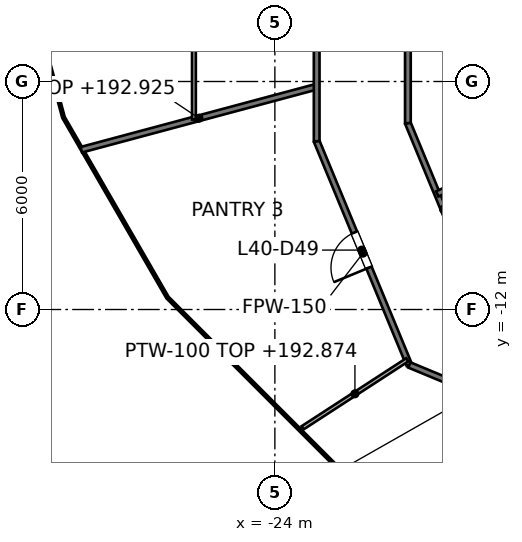
"""IFC4 building model, lengths in metres.
Left out: names, types, materials, properties, quantities, classifications, styles, units other than length and angle.
Written with IfcOpenShell. Run it as: python <this file> out.ifc"""

import sys

from ifc_helpers import new_model, si_unit, direction, frame, frame_2d, origin, place, context, subcontext, project, spatial, rectangle, extrude, element, fill, save


model = new_model("IFC4")
c1 = context("Model", 3, precision=1e-05, world=origin(), true_north=direction((0.0, 1.0)))
c2 = subcontext(c1, "Body", "Model", "MODEL_VIEW")
j1 = project(units=[si_unit("LENGTHUNIT", "METRE"), si_unit("PLANEANGLEUNIT", "RADIAN")], contexts=[c1])
p1 = place(None, origin())
s1 = spatial("IfcSite", under=j1, at=p1, CompositionType="ELEMENT")
p2 = place(p1, origin())
s2 = spatial("IfcBuilding", under=s1, at=p2, CompositionType="ELEMENT")
p3 = place(p2, frame((0.0, 0.0, 189.6)))
s3 = spatial("IfcBuildingStorey", under=s2, at=p3, CompositionType="ELEMENT", Elevation=189.6)
p4 = place(p3, frame((-22.9, -7.572, 0.0), z_axis=(0.0, 0.0, 1.0), x_axis=(0.382367581622, -0.924010298928, 0.0)))
e1 = element("IfcWall", 1, at=p4, inside=s3, PredefinedType="PARTITIONING", context=c2, shape_type="SweptSolid", body=[
    extrude(rectangle(XDim=6.374, YDim=0.15, at=frame_2d((3.187, 0.0))), origin(), (0.0, 0.0, 1.0), 2.777),
])
p5 = place(p4, frame((2.6, 0.0, 0.0)))
e2 = element("IfcOpeningElement", 2, at=p5, cuts=e1, PredefinedType="OPENING", context=c2, shape_type="SweptSolid", body=[
    extrude(rectangle(XDim=1.0, YDim=2.1, at=frame_2d((0.5, 1.05))), frame((0.0, 0.075, 0.0), z_axis=(0.0, -1.0, 0.0), x_axis=(1.0, 0.0, 0.0)), (0.0, 0.0, 1.0), 0.15),
])
p6 = place(p3, frame((-20.5, -7.095, 0.0), z_axis=(0.0, 0.0, 1.0), x_axis=(0.382364990163, -0.924011371303, 0.0)))
e3 = element("IfcWall", 3, at=p6, inside=s3, PredefinedType="PARTITIONING", context=c2, shape_type="SweptSolid", body=[
    extrude(rectangle(XDim=4.902, YDim=0.15, at=frame_2d((2.451, 0.0))), origin(), (0.0, 0.0, 1.0), 2.845),
])
p7 = place(p3, frame((-20.46, -13.46, 0.0), z_axis=(0.0, 0.0, 1.0), x_axis=(0.923801547606, -0.382871650349, 0.0)))
e4 = element("IfcWall", 4, at=p7, inside=s3, PredefinedType="PARTITIONING", context=c2, shape_type="SweptSolid", body=[
    extrude(rectangle(XDim=6.415, YDim=0.15, at=frame_2d((3.208, 0.0))), origin(), (0.0, 0.0, 1.0), 2.777),
])
p8 = place(p7, frame((2.707, 0.0, 0.0)))
e5 = element("IfcOpeningElement", 5, at=p8, cuts=e4, PredefinedType="OPENING", context=c2, shape_type="SweptSolid", body=[
    extrude(rectangle(XDim=1.0, YDim=2.1, at=frame_2d((0.5, 1.05))), frame((0.0, 0.075, 0.0), z_axis=(0.0, -1.0, 0.0), x_axis=(1.0, 0.0, 0.0)), (0.0, 0.0, 1.0), 0.15),
])
p9 = place(p3, frame((-29.094, -7.796, 0.0), z_axis=(0.0, 0.0, 1.0), x_axis=(0.965917630497, 0.258849630277, 0.0)))
e6 = element("IfcWall", 6, at=p9, inside=s3, PredefinedType="PARTITIONING", context=c2, shape_type="SweptSolid", body=[
    extrude(rectangle(XDim=6.413, YDim=0.15, at=frame_2d((3.206, 0.0))), origin(), (0.0, 0.0, 1.0), 3.325),
])
p10 = place(p3, frame((-19.728, -8.958, 0.0), z_axis=(0.0, 0.0, 1.0), x_axis=(0.910629511797, 0.413223779863, 0.0)))
e7 = element("IfcWall", 7, at=p10, inside=s3, PredefinedType="PARTITIONING", context=c2, shape_type="SweptSolid", body=[
    extrude(rectangle(XDim=5.368, YDim=0.15, at=frame_2d((2.684, 0.0))), origin(), (0.0, 0.0, 1.0), 3.7),
])
p11 = place(p3, frame((-20.5, -7.095, 0.0), z_axis=(0.0, 0.0, 1.0), x_axis=(0.0, 1.0, 0.0)))
e8 = element("IfcWall", 8, at=p11, inside=s3, PredefinedType="PARTITIONING", context=c2, shape_type="SweptSolid", body=[
    extrude(rectangle(XDim=14.569, YDim=0.15, at=frame_2d((7.285, 0.0))), origin(), (0.0, 0.0, 1.0), 2.768),
])
p12 = place(p11, frame((10.234, 0.0, 0.0)))
e9 = element("IfcOpeningElement", 9, at=p12, cuts=e8, PredefinedType="OPENING", context=c2, shape_type="SweptSolid", body=[
    extrude(rectangle(XDim=1.0, YDim=2.1, at=frame_2d((0.5, 1.05))), frame((0.0, 0.075, 0.0), z_axis=(0.0, -1.0, 0.0), x_axis=(1.0, 0.0, 0.0)), (0.0, 0.0, 1.0), 0.15),
])
p13 = place(p11, frame((3.0, 0.0, 0.0)))
e10 = element("IfcOpeningElement", 10, at=p13, cuts=e8, PredefinedType="OPENING", context=c2, shape_type="SweptSolid", body=[
    extrude(rectangle(XDim=1.0, YDim=2.1, at=frame_2d((0.5, 1.05))), frame((0.0, 0.075, 0.0), z_axis=(0.0, -1.0, 0.0), x_axis=(1.0, 0.0, 0.0)), (0.0, 0.0, 1.0), 0.15),
])
p14 = place(p3, frame((-22.9, -7.572, 0.0), z_axis=(0.0, 0.0, 1.0), x_axis=(0.0, 1.0, 0.0)))
e11 = element("IfcWall", 11, at=p14, inside=s3, PredefinedType="PARTITIONING", context=c2, shape_type="SweptSolid", body=[
    extrude(rectangle(XDim=15.689, YDim=0.15, at=frame_2d((7.844, 0.0))), origin(), (0.0, 0.0, 1.0), 2.768),
])
p15 = place(p14, frame((6.438, 0.0, 0.0)))
e12 = element("IfcOpeningElement", 12, at=p15, cuts=e11, PredefinedType="OPENING", context=c2, shape_type="SweptSolid", body=[
    extrude(rectangle(XDim=1.0, YDim=2.1, at=frame_2d((0.5, 1.05))), frame((0.0, 0.075, 0.0), z_axis=(0.0, -1.0, 0.0), x_axis=(1.0, 0.0, 0.0)), (0.0, 0.0, 1.0), 0.15),
])
p16 = place(p3, frame((-23.271, -15.113, 0.0), z_axis=(0.0, 0.0, 1.0), x_axis=(0.83866769183, 0.544643463819, 0.0)))
e13 = element("IfcWall", 13, at=p16, inside=s3, PredefinedType="PARTITIONING", context=c2, shape_type="SweptSolid", body=[
    extrude(rectangle(XDim=3.285, YDim=0.1, at=frame_2d((1.643, 0.0))), origin(), (0.0, 0.0, 1.0), 3.273),
])
p17 = place(p3, frame((-26.13, -7.002, 0.0), z_axis=(0.0, 0.0, 1.0), x_axis=(0.0, 1.0, 0.0)))
e14 = element("IfcWall", 14, at=p17, inside=s3, PredefinedType="PARTITIONING", context=c2, shape_type="SweptSolid", body=[
    extrude(rectangle(XDim=15.985, YDim=0.1, at=frame_2d((7.992, 0.0))), origin(), (0.0, 0.0, 1.0), 2.768),
])
p18 = place(p17, frame((5.828, 0.0, 0.0)))
e15 = element("IfcOpeningElement", 15, at=p18, cuts=e14, PredefinedType="OPENING", context=c2, shape_type="SweptSolid", body=[
    extrude(rectangle(XDim=0.9, YDim=2.1, at=frame_2d((0.45, 1.05))), frame((0.0, 0.05, 0.0), z_axis=(0.0, -1.0, 0.0), x_axis=(1.0, 0.0, 0.0)), (0.0, 0.0, 1.0), 0.1),
])
p19 = place(p5, origin())
e16 = element("IfcDoor", 16, at=p19, inside=s3, OperationType="SINGLE_SWING_RIGHT", PredefinedType="DOOR", context=c2, shape_type="SweptSolid", body=[
    extrude(rectangle(XDim=1.0, YDim=2.1, at=frame_2d((0.5, 1.05))), frame((0.0, 0.025, 0.0), z_axis=(0.0, -1.0, 0.0), x_axis=(1.0, 0.0, 0.0)), (0.0, 0.0, 1.0), 0.05),
])
fill(e2, e16)
save(model, sys.argv[1])
